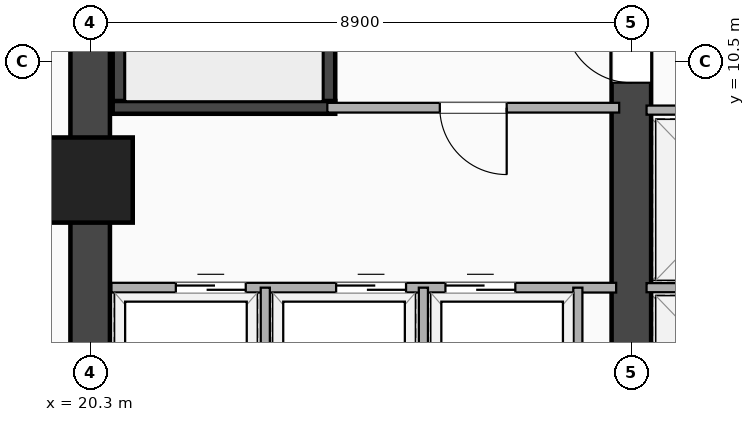
"""IFC4 building model, lengths in metres.
Left out: names, types, materials, properties, quantities, classifications, styles, units other than length and angle.
Written with IfcOpenShell. Run it as: python <this file> out.ifc"""

import sys

from ifc_helpers import new_model, si_unit, direction, frame, frame_2d, origin, origin_2d, place, context, subcontext, project, spatial, rectangle, extrude, element, fill, save


model = new_model("IFC4")
c1 = context("Model", 3, precision=1e-05, world=origin(), true_north=direction((0.0, 1.0)))
c2 = subcontext(c1, "Body", "Model", "MODEL_VIEW")
j1 = project(units=[si_unit("LENGTHUNIT", "METRE"), si_unit("PLANEANGLEUNIT", "RADIAN")], contexts=[c1])
p1 = place(None, origin())
s1 = spatial("IfcSite", under=j1, at=p1, CompositionType="ELEMENT")
p2 = place(p1, origin())
s2 = spatial("IfcBuilding", under=s1, at=p2, CompositionType="ELEMENT")
p3 = place(p2, frame((0.0, 0.0, 50.9)))
s3 = spatial("IfcBuildingStorey", under=s2, at=p3, CompositionType="ELEMENT", Elevation=50.9)
p4 = place(p3, frame((20.3, 3.5, 0.0), z_axis=(0.0, 0.0, 1.0), x_axis=(0.0, 1.0, 0.0)))
e1 = element("IfcWall", 1, at=p4, inside=s3, PredefinedType="SHEAR", context=c2, shape_type="SweptSolid", body=[
    extrude(rectangle(XDim=16.9, YDim=0.65, at=frame_2d((8.45, 0.0))), origin(), (0.0, 0.0, 1.0), 3.22),
])
p5 = place(p3, frame((29.2, 3.5, 0.0), z_axis=(0.0, 0.0, 1.0), x_axis=(0.0, 1.0, 0.0)))
e2 = element("IfcWall", 2, at=p5, inside=s3, PredefinedType="SHEAR", context=c2, shape_type="SweptSolid", body=[
    extrude(rectangle(XDim=16.9, YDim=0.65, at=frame_2d((8.45, 0.0))), origin(), (0.0, 0.0, 1.0), 3.22),
])
p6 = place(p5, frame((7.75, 0.0, 0.0), z_axis=(0.0, 0.0, 1.0), x_axis=(-1.0, 0.0, 0.0)))
e3 = element("IfcOpeningElement", 3, at=p6, cuts=e2, PredefinedType="OPENING", context=c2, shape_type="SweptSolid", body=[
    extrude(rectangle(XDim=1.1, YDim=2.15, at=frame_2d((0.55, 1.075))), frame((0.0, 0.335, 0.0), z_axis=(0.0, -1.0, 0.0), x_axis=(1.0, 0.0, 0.0)), (0.0, 0.0, 1.0), 0.67),
])
for number, where, z_axis, x_axis in (
    (4, (20.775, 9.745, 0.0), (0.0, 0.0, 1.0), (0.0, 1.0, 0.0)),
    (5, (24.225, 9.745, 0.0), (0.0, 0.0, 1.0), (0.0, 1.0, 0.0)),
):
    element("IfcWall", number, at=place(p3, frame(where, z_axis=z_axis, x_axis=x_axis)), inside=s3, PredefinedType="SHEAR", context=c2, shape_type="SweptSolid", body=[
        extrude(rectangle(XDim=8.01, YDim=0.21, at=frame_2d((4.005, 0.0))), origin(), (0.0, 0.0, 1.0), 3.22),
    ])
p7 = place(p3, frame((20.67, 9.745, 0.0), z_axis=(0.0, 0.0, 1.0), x_axis=(1.0, 0.0, 0.0)))
e6 = element("IfcWall", 6, at=p7, inside=s3, PredefinedType="SHEAR", context=c2, shape_type="SweptSolid", body=[
    extrude(rectangle(XDim=3.66, YDim=0.21, at=frame_2d((1.83, 0.0))), origin(), (0.0, 0.0, 1.0), 3.22),
])
p8 = place(p3, frame((20.3, 8.55, -0.28), z_axis=(0.0, 0.0, 1.0), x_axis=(1.0, 0.0, 0.0)))
e7 = element("IfcColumn", 7, at=p8, inside=s3, PredefinedType="COLUMN", context=c2, shape_type="SweptSolid", body=[
    extrude(rectangle(XDim=1.4, YDim=1.4, at=origin_2d()), origin(), (0.0, 0.0, 1.0), 3.5),
])
p9 = place(p3, frame((20.65, 6.78, 0.0), z_axis=(0.0, 0.0, 1.0), x_axis=(1.0, 0.0, 0.0)))
e8 = element("IfcWall", 8, at=p9, inside=s3, PredefinedType="PARTITIONING", context=c2, shape_type="SweptSolid", body=[
    extrude(rectangle(XDim=8.3, YDim=0.16, at=frame_2d((4.15, 0.0))), origin(), (0.0, 0.0, 1.0), 2.51),
])
p10 = place(p9, frame((3.695, 0.0, 0.0)))
e9 = element("IfcOpeningElement", 9, at=p10, cuts=e8, PredefinedType="OPENING", context=c2, shape_type="SweptSolid", body=[
    extrude(rectangle(XDim=1.15, YDim=2.2, at=frame_2d((0.575, 1.1))), frame((0.0, 0.09, 0.0), z_axis=(0.0, -1.0, 0.0), x_axis=(1.0, 0.0, 0.0)), (0.0, 0.0, 1.0), 0.18),
])
p11 = place(p9, frame((5.492, 0.0, 0.0)))
e10 = element("IfcOpeningElement", 10, at=p11, cuts=e8, PredefinedType="OPENING", context=c2, shape_type="SweptSolid", body=[
    extrude(rectangle(XDim=1.15, YDim=2.2, at=frame_2d((0.575, 1.1))), frame((0.0, 0.09, 0.0), z_axis=(0.0, -1.0, 0.0), x_axis=(1.0, 0.0, 0.0)), (0.0, 0.0, 1.0), 0.18),
])
p12 = place(p9, frame((1.059, 0.0, 0.0)))
e11 = element("IfcOpeningElement", 11, at=p12, cuts=e8, PredefinedType="OPENING", context=c2, shape_type="SweptSolid", body=[
    extrude(rectangle(XDim=1.15, YDim=2.2, at=frame_2d((0.575, 1.1))), frame((0.0, 0.09, 0.0), z_axis=(0.0, -1.0, 0.0), x_axis=(1.0, 0.0, 0.0)), (0.0, 0.0, 1.0), 0.18),
])
for number, where, z_axis, x_axis in (
    (12, (23.18, 3.9, 0.0), (0.0, 0.0, 1.0), (0.0, 1.0, 0.0)),
    (13, (25.78, 3.9, 0.0), (0.0, 0.0, 1.0), (0.0, 1.0, 0.0)),
    (14, (28.32, 3.9, 0.0), (0.0, 0.0, 1.0), (0.0, 1.0, 0.0)),
):
    element("IfcWall", number, at=place(p3, frame(where, z_axis=z_axis, x_axis=x_axis)), inside=s3, PredefinedType="PARTITIONING", context=c2, shape_type="SweptSolid", body=[
        extrude(rectangle(XDim=2.88, YDim=0.15, at=frame_2d((1.44, 0.0))), origin(), (0.0, 0.0, 1.0), 3.22),
    ])
p13 = place(p3, frame((24.2, 9.74, 0.0), z_axis=(0.0, 0.0, 1.0), x_axis=(1.0, 0.0, 0.0)))
e15 = element("IfcWall", 15, at=p13, inside=s3, PredefinedType="PARTITIONING", context=c2, shape_type="SweptSolid", body=[
    extrude(rectangle(XDim=4.8, YDim=0.16, at=frame_2d((2.4, 0.0))), origin(), (0.0, 0.0, 1.0), 3.22),
])
p14 = place(p13, frame((1.85, 0.0, 0.0)))
e16 = element("IfcOpeningElement", 16, at=p14, cuts=e15, PredefinedType="OPENING", context=c2, shape_type="SweptSolid", body=[
    extrude(rectangle(XDim=1.1, YDim=2.15, at=frame_2d((0.55, 1.075))), frame((0.0, 0.09, 0.0), z_axis=(0.0, -1.0, 0.0), x_axis=(1.0, 0.0, 0.0)), (0.0, 0.0, 1.0), 0.18),
])
for number, where, z_axis, x_axis in (
    (17, (29.45, 6.78, 0.0), (0.0, 0.0, 1.0), (1.0, 0.0, 0.0)),
    (18, (29.45, 9.7, 0.0), (0.0, 0.0, 1.0), (1.0, 0.0, 0.0)),
):
    element("IfcWall", number, at=place(p3, frame(where, z_axis=z_axis, x_axis=x_axis)), inside=s3, PredefinedType="PARTITIONING", context=c2, shape_type="SweptSolid", body=[
        extrude(rectangle(XDim=2.77, YDim=0.15, at=frame_2d((1.385, 0.0))), origin(), (0.0, 0.0, 1.0), 3.22),
    ])
p15 = place(p6, origin())
e19 = element("IfcDoor", 19, at=p15, inside=s3, OperationType="SINGLE_SWING_RIGHT", PredefinedType="DOOR", context=c2, shape_type="SweptSolid", body=[
    extrude(rectangle(XDim=1.1, YDim=2.15, at=frame_2d((0.55, 1.075))), frame((0.0, 0.025, 0.0), z_axis=(0.0, -1.0, 0.0), x_axis=(1.0, 0.0, 0.0)), (0.0, 0.0, 1.0), 0.05),
])
fill(e3, e19)
p16 = place(p10, origin())
e20 = element("IfcDoor", 20, at=p16, inside=s3, OperationType="DOUBLE_DOOR_SLIDING", PredefinedType="DOOR", context=c2, shape_type="SweptSolid", body=[
    extrude(rectangle(XDim=1.15, YDim=2.2, at=frame_2d((0.575, 1.1))), frame((0.0, 0.025, 0.0), z_axis=(0.0, -1.0, 0.0), x_axis=(1.0, 0.0, 0.0)), (0.0, 0.0, 1.0), 0.05),
])
fill(e9, e20)
p17 = place(p11, origin())
e21 = element("IfcDoor", 21, at=p17, inside=s3, OperationType="DOUBLE_DOOR_SLIDING", PredefinedType="DOOR", context=c2, shape_type="SweptSolid", body=[
    extrude(rectangle(XDim=1.15, YDim=2.2, at=frame_2d((0.575, 1.1))), frame((0.0, 0.025, 0.0), z_axis=(0.0, -1.0, 0.0), x_axis=(1.0, 0.0, 0.0)), (0.0, 0.0, 1.0), 0.05),
])
fill(e10, e21)
p18 = place(p12, origin())
e22 = element("IfcDoor", 22, at=p18, inside=s3, OperationType="DOUBLE_DOOR_SLIDING", PredefinedType="DOOR", context=c2, shape_type="SweptSolid", body=[
    extrude(rectangle(XDim=1.15, YDim=2.2, at=frame_2d((0.575, 1.1))), frame((0.0, 0.025, 0.0), z_axis=(0.0, -1.0, 0.0), x_axis=(1.0, 0.0, 0.0)), (0.0, 0.0, 1.0), 0.05),
])
fill(e11, e22)
p19 = place(p14, origin())
e23 = element("IfcDoor", 23, at=p19, inside=s3, OperationType="SINGLE_SWING_RIGHT", PredefinedType="DOOR", context=c2, shape_type="SweptSolid", body=[
    extrude(rectangle(XDim=1.1, YDim=2.15, at=frame_2d((0.55, 1.075))), frame((0.0, 0.025, 0.0), z_axis=(0.0, -1.0, 0.0), x_axis=(1.0, 0.0, 0.0)), (0.0, 0.0, 1.0), 0.05),
])
fill(e16, e23)
save(model, sys.argv[1])
